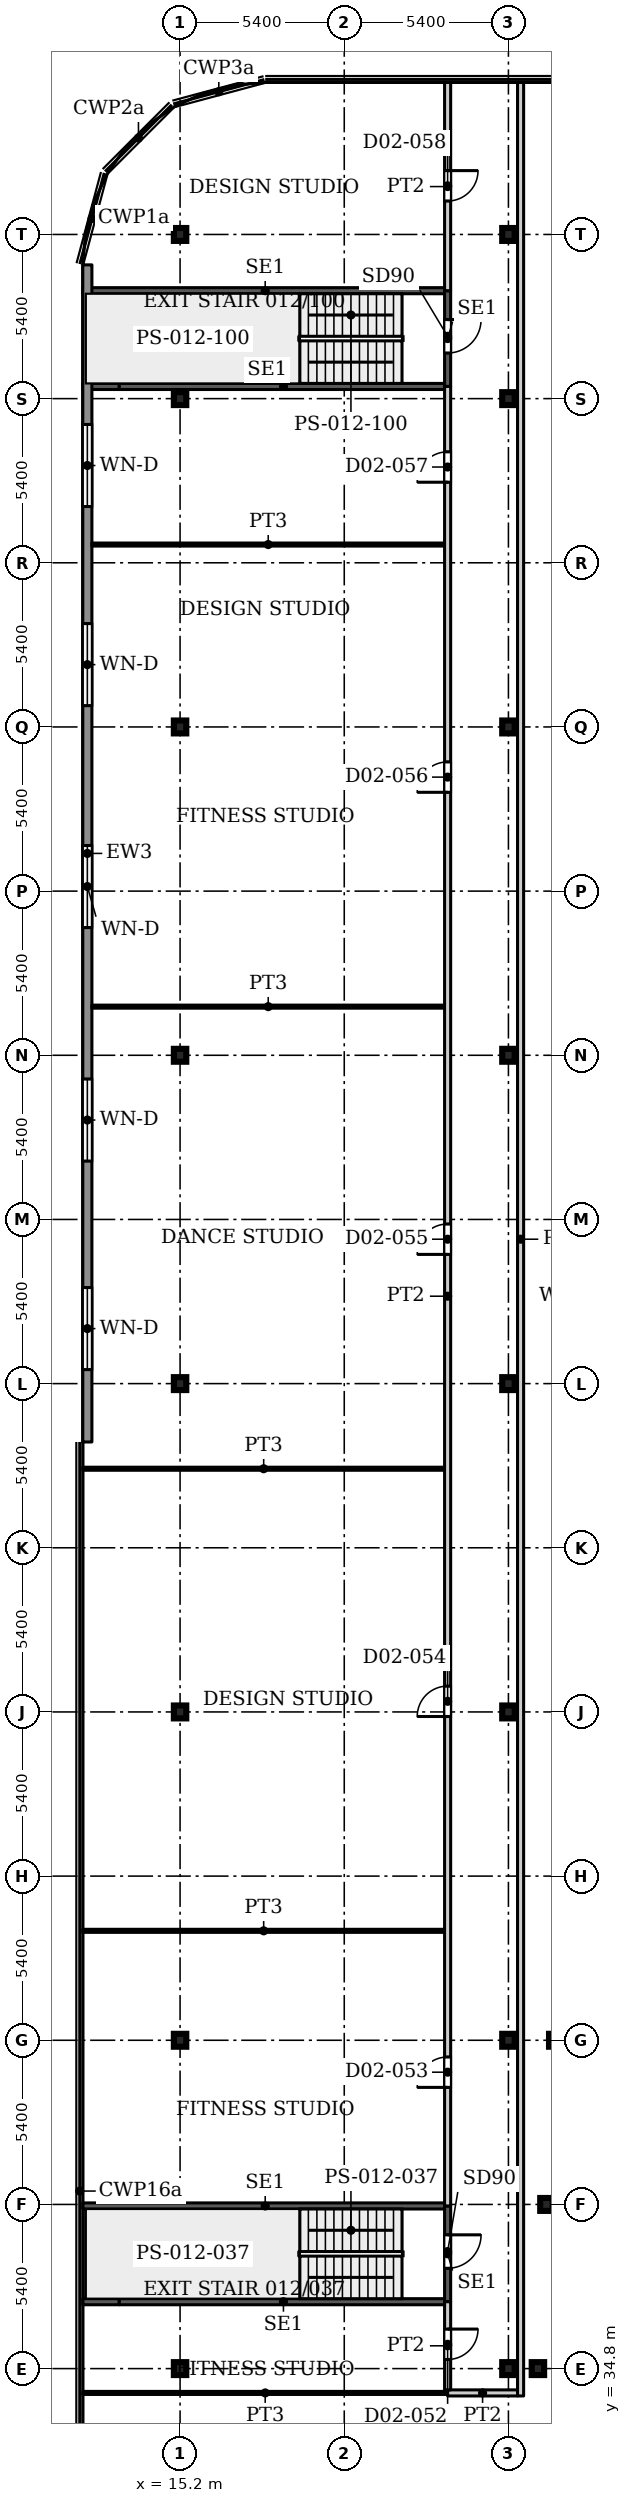
"""IFC4 building model, lengths in metres.
Left out: names, types, materials, properties, quantities, classifications, styles, units other than length and angle.
Written with IfcOpenShell. Run it as: python <this file> out.ifc"""

import sys

from ifc_helpers import new_model, si_unit, direction, frame, frame_2d, origin, origin_2d, place, context, subcontext, project, spatial, rectangle, i_section, extrude, source, transform, mapped, element, fill, save


model = new_model("IFC4")
c1 = context("Model", 3, precision=1e-05, world=origin(), true_north=direction((0.0, 1.0)))
c2 = subcontext(c1, "Body", "Model", "MODEL_VIEW")
j1 = project(units=[si_unit("LENGTHUNIT", "METRE"), si_unit("PLANEANGLEUNIT", "RADIAN")], contexts=[c1])
p1 = place(None, origin())
s1 = spatial("IfcSite", under=j1, at=p1, CompositionType="ELEMENT")
p2 = place(p1, origin())
s2 = spatial("IfcBuilding", under=s1, at=p2, CompositionType="ELEMENT")
p3 = place(p2, frame((0.0, 0.0, 12.5)))
s3 = spatial("IfcBuildingStorey", under=s2, at=p3, CompositionType="ELEMENT", Elevation=12.5)
for number, where, z_axis, x_axis in (
    (1, (15.2, 34.8, 0.0), (0.0, 0.0, 1.0), (1.0, 0.0, 0.0)),
    (2, (26.0, 34.8, 0.0), (0.0, 0.0, 1.0), (1.0, 0.0, 0.0)),
    (3, (15.2, 45.6, 0.0), (0.0, 0.0, 1.0), (1.0, 0.0, 0.0)),
    (4, (26.0, 45.6, 0.0), (0.0, 0.0, 1.0), (1.0, 0.0, 0.0)),
    (5, (15.2, 56.4, 0.0), (0.0, 0.0, 1.0), (1.0, 0.0, 0.0)),
    (6, (26.0, 56.4, 0.0), (0.0, 0.0, 1.0), (1.0, 0.0, 0.0)),
    (7, (15.2, 67.2, 0.0), (0.0, 0.0, 1.0), (1.0, 0.0, 0.0)),
    (8, (26.0, 67.2, 0.0), (0.0, 0.0, 1.0), (1.0, 0.0, 0.0)),
    (9, (15.2, 78.0, 0.0), (0.0, 0.0, 1.0), (1.0, 0.0, 0.0)),
    (10, (26.0, 78.0, 0.0), (0.0, 0.0, 1.0), (1.0, 0.0, 0.0)),
    (11, (15.2, 88.8, 0.0), (0.0, 0.0, 1.0), (1.0, 0.0, 0.0)),
    (12, (26.0, 88.8, 0.0), (0.0, 0.0, 1.0), (1.0, 0.0, 0.0)),
    (13, (15.2, 99.6, 0.0), (0.0, 0.0, 1.0), (1.0, 0.0, 0.0)),
    (14, (26.0, 99.6, 0.0), (0.0, 0.0, 1.0), (1.0, 0.0, 0.0)),
    (15, (15.2, 105.0, 0.0), (0.0, 0.0, 1.0), (1.0, 0.0, 0.0)),
    (16, (26.0, 105.0, 0.0), (0.0, 0.0, 1.0), (1.0, 0.0, 0.0)),
    (17, (26.97, 34.8, 0.0), (0.0, 0.0, 1.0), (1.0, 0.0, 0.0)),
    (18, (27.25, 40.2, 0.0), (0.0, 0.0, 1.0), (1.0, 0.0, 0.0)),
    (19, (27.54, 45.6, 0.0), (0.0, 0.0, 1.0), (1.0, 0.0, 0.0)),
):
    element("IfcColumn", number, at=place(p3, frame(where, z_axis=z_axis, x_axis=x_axis)), inside=s3, PredefinedType="COLUMN", context=c2, shape_type="SweptSolid", body=[
        extrude(i_section(OverallWidth=0.409, OverallDepth=0.425, WebThickness=0.033, FlangeThickness=0.052, FilletRadius=0.013, at=origin_2d()), origin(), (0.0, 0.0, 1.0), 4.5),
    ])
p4 = place(p3, frame((12.15, 65.28, 0.0), z_axis=(0.0, 0.0, 1.0), x_axis=(0.0, 1.0, 0.0)))
e20 = element("IfcWall", 20, at=p4, inside=s3, PredefinedType="SOLIDWALL", context=c2, shape_type="SweptSolid", body=[
    extrude(rectangle(XDim=38.72, YDim=0.3, at=frame_2d((19.36, 0.0))), origin(), (0.0, 0.0, 1.0), 4.25),
])
p5 = place(p4, frame((2.38, 0.0, 0.9)))
e21 = element("IfcOpeningElement", 21, at=p5, cuts=e20, PredefinedType="OPENING", context=c2, shape_type="SweptSolid", body=[
    extrude(rectangle(XDim=2.7, YDim=2.1, at=frame_2d((1.35, 1.05))), frame((0.0, 0.16, 0.0), z_axis=(0.0, -1.0, 0.0), x_axis=(1.0, 0.0, 0.0)), (0.0, 0.0, 1.0), 0.32),
])
p6 = place(p4, frame((9.24, 0.0, 0.9)))
e22 = element("IfcOpeningElement", 22, at=p6, cuts=e20, PredefinedType="OPENING", context=c2, shape_type="SweptSolid", body=[
    extrude(rectangle(XDim=2.7, YDim=2.1, at=frame_2d((1.35, 1.05))), frame((0.0, 0.16, 0.0), z_axis=(0.0, -1.0, 0.0), x_axis=(1.0, 0.0, 0.0)), (0.0, 0.0, 1.0), 0.32),
])
p7 = place(p4, frame((16.92, 0.0, 0.9)))
e23 = element("IfcOpeningElement", 23, at=p7, cuts=e20, PredefinedType="OPENING", context=c2, shape_type="SweptSolid", body=[
    extrude(rectangle(XDim=2.7, YDim=2.1, at=frame_2d((1.35, 1.05))), frame((0.0, 0.16, 0.0), z_axis=(0.0, -1.0, 0.0), x_axis=(1.0, 0.0, 0.0)), (0.0, 0.0, 1.0), 0.32),
])
p8 = place(p4, frame((24.22, 0.0, 0.9)))
e24 = element("IfcOpeningElement", 24, at=p8, cuts=e20, PredefinedType="OPENING", context=c2, shape_type="SweptSolid", body=[
    extrude(rectangle(XDim=2.7, YDim=2.1, at=frame_2d((1.35, 1.05))), frame((0.0, 0.16, 0.0), z_axis=(0.0, -1.0, 0.0), x_axis=(1.0, 0.0, 0.0)), (0.0, 0.0, 1.0), 0.32),
])
p9 = place(p4, frame((30.77, 0.0, 0.9)))
e25 = element("IfcOpeningElement", 25, at=p9, cuts=e20, PredefinedType="OPENING", context=c2, shape_type="SweptSolid", body=[
    extrude(rectangle(XDim=2.7, YDim=2.1, at=frame_2d((1.35, 1.05))), frame((0.0, 0.16, 0.0), z_axis=(0.0, -1.0, 0.0), x_axis=(1.0, 0.0, 0.0)), (0.0, 0.0, 1.0), 0.32),
])
p10 = place(p3, frame((12.0, 37.0, 0.0), z_axis=(0.0, 0.0, 1.0), x_axis=(1.0, 0.0, 0.0)))
e26 = element("IfcWall", 26, at=p10, inside=s3, PredefinedType="SHEAR", context=c2, shape_type="SweptSolid", body=[
    extrude(rectangle(XDim=1.2, YDim=0.2, at=frame_2d((0.6, 0.0))), origin(), (0.0, 0.0, 1.0), 4.5),
])
p11 = place(p3, frame((13.2, 37.0, 0.0), z_axis=(0.0, 0.0, 1.0), x_axis=(1.0, 0.0, 0.0)))
e27 = element("IfcWall", 27, at=p11, inside=s3, PredefinedType="SHEAR", context=c2, shape_type="SweptSolid", body=[
    extrude(rectangle(XDim=10.8, YDim=0.2, at=frame_2d((5.4, 0.0))), origin(), (0.0, 0.0, 1.0), 4.5),
])
p12 = place(p3, frame((12.0, 40.15, 0.0), z_axis=(0.0, 0.0, 1.0), x_axis=(1.0, 0.0, 0.0)))
e28 = element("IfcWall", 28, at=p12, inside=s3, PredefinedType="SHEAR", context=c2, shape_type="SweptSolid", body=[
    extrude(rectangle(XDim=12.0, YDim=0.2, at=frame_2d((6.0, 0.0))), origin(), (0.0, 0.0, 1.0), 4.5),
])
p13 = place(p3, frame((24.0, 37.0, 0.0), z_axis=(0.0, 0.0, 1.0), x_axis=(0.0, 1.0, 0.0)))
e29 = element("IfcWall", 29, at=p13, inside=s3, PredefinedType="SHEAR", context=c2, shape_type="SweptSolid", body=[
    extrude(rectangle(XDim=3.15, YDim=0.2, at=frame_2d((1.575, 0.0))), origin(), (0.0, 0.0, 1.0), 4.5),
])
p14 = place(p13, frame((1.1, 0.0, 0.0)))
e30 = element("IfcOpeningElement", 30, at=p14, cuts=e29, PredefinedType="OPENING", context=c2, shape_type="SweptSolid", body=[
    extrude(rectangle(XDim=1.1, YDim=2.2, at=frame_2d((0.55, 1.1))), frame((0.0, 0.11, 0.0), z_axis=(0.0, -1.0, 0.0), x_axis=(1.0, 0.0, 0.0)), (0.0, 0.0, 1.0), 0.22),
])
p15 = place(p3, frame((12.0, 100.0, 0.0), z_axis=(0.0, 0.0, 1.0), x_axis=(1.0, 0.0, 0.0)))
e31 = element("IfcWall", 31, at=p15, inside=s3, PredefinedType="SHEAR", context=c2, shape_type="SweptSolid", body=[
    extrude(rectangle(XDim=1.2, YDim=0.2, at=frame_2d((0.6, 0.0))), origin(), (0.0, 0.0, 1.0), 4.5),
])
p16 = place(p3, frame((13.2, 100.0, 0.0), z_axis=(0.0, 0.0, 1.0), x_axis=(1.0, 0.0, 0.0)))
e32 = element("IfcWall", 32, at=p16, inside=s3, PredefinedType="SHEAR", context=c2, shape_type="SweptSolid", body=[
    extrude(rectangle(XDim=10.8, YDim=0.2, at=frame_2d((5.4, 0.0))), origin(), (0.0, 0.0, 1.0), 4.5),
])
p17 = place(p3, frame((12.0, 103.15, 0.0), z_axis=(0.0, 0.0, 1.0), x_axis=(1.0, 0.0, 0.0)))
e33 = element("IfcWall", 33, at=p17, inside=s3, PredefinedType="SHEAR", context=c2, shape_type="SweptSolid", body=[
    extrude(rectangle(XDim=12.0, YDim=0.2, at=frame_2d((6.0, 0.0))), origin(), (0.0, 0.0, 1.0), 4.5),
])
p18 = place(p3, frame((24.0, 100.0, 0.0), z_axis=(0.0, 0.0, 1.0), x_axis=(0.0, 1.0, 0.0)))
e34 = element("IfcWall", 34, at=p18, inside=s3, PredefinedType="SHEAR", context=c2, shape_type="SweptSolid", body=[
    extrude(rectangle(XDim=3.15, YDim=0.2, at=frame_2d((1.575, 0.0))), origin(), (0.0, 0.0, 1.0), 4.5),
])
p19 = place(p18, frame((1.1, 0.0, 0.0)))
e35 = element("IfcOpeningElement", 35, at=p19, cuts=e34, PredefinedType="OPENING", context=c2, shape_type="SweptSolid", body=[
    extrude(rectangle(XDim=1.1, YDim=2.2, at=frame_2d((0.55, 1.1))), frame((0.0, 0.11, 0.0), z_axis=(0.0, -1.0, 0.0), x_axis=(1.0, 0.0, 0.0)), (0.0, 0.0, 1.0), 0.22),
])
p20 = place(p3, frame((12.0, 34.0, 0.0), z_axis=(0.0, 0.0, 1.0), x_axis=(1.0, 0.0, 0.0)))
e36 = element("IfcWall", 36, at=p20, inside=s3, PredefinedType="PARTITIONING", context=c2, shape_type="SweptSolid", body=[
    extrude(rectangle(XDim=12.0, YDim=0.1, at=frame_2d((6.0, 0.0))), origin(), (0.0, 0.0, 1.0), 4.18),
])
for number, where, z_axis, x_axis in (
    (37, (12.0, 49.2, 0.0), (0.0, 0.0, 1.0), (1.0, 0.0, 0.0)),
    (38, (12.0, 64.4, 0.0), (0.0, 0.0, 1.0), (1.0, 0.0, 0.0)),
):
    element("IfcWall", number, at=place(p3, frame(where, z_axis=z_axis, x_axis=x_axis)), inside=s3, PredefinedType="PARTITIONING", context=c2, shape_type="SweptSolid", body=[
        extrude(rectangle(XDim=11.9, YDim=0.1, at=frame_2d((5.95, 0.0))), origin(), (0.0, 0.0, 1.0), 4.18),
    ])
for number, where, z_axis, x_axis in (
    (39, (12.299, 79.6, 0.0), (0.0, 0.0, 1.0), (1.0, 0.0, 0.0)),
    (40, (12.299, 94.8, 0.0), (0.0, 0.0, 1.0), (1.0, 0.0, 0.0)),
):
    element("IfcWall", number, at=place(p3, frame(where, z_axis=z_axis, x_axis=x_axis)), inside=s3, PredefinedType="PARTITIONING", context=c2, shape_type="SweptSolid", body=[
        extrude(rectangle(XDim=11.601, YDim=0.1, at=frame_2d((5.8, 0.0))), origin(), (0.0, 0.0, 1.0), 4.18),
    ])
p21 = place(p3, frame((24.0, 34.0, 0.0), z_axis=(0.0, 0.0, 1.0), x_axis=(1.0, 0.0, 0.0)))
e41 = element("IfcWall", 41, at=p21, inside=s3, PredefinedType="PARTITIONING", context=c2, shape_type="SweptSolid", body=[
    extrude(rectangle(XDim=2.3, YDim=0.2, at=frame_2d((1.15, 0.0))), origin(), (0.0, 0.0, 1.0), 4.18),
])
p22 = place(p3, frame((24.0, 34.1, 0.0), z_axis=(0.0, 0.0, 1.0), x_axis=(0.0, 1.0, 0.0)))
e42 = element("IfcWall", 42, at=p22, inside=s3, PredefinedType="PARTITIONING", context=c2, shape_type="SweptSolid", body=[
    extrude(rectangle(XDim=2.9, YDim=0.2, at=frame_2d((1.45, 0.0))), origin(), (0.0, 0.0, 1.0), 4.18),
])
p23 = place(p22, frame((1.0, 0.0, 0.0)))
e43 = element("IfcOpeningElement", 43, at=p23, cuts=e42, PredefinedType="OPENING", context=c2, shape_type="SweptSolid", body=[
    extrude(rectangle(XDim=1.0, YDim=2.1, at=frame_2d((0.5, 1.05))), frame((0.0, 0.11, 0.0), z_axis=(0.0, -1.0, 0.0), x_axis=(1.0, 0.0, 0.0)), (0.0, 0.0, 1.0), 0.22),
])
p24 = place(p3, frame((24.0, 40.15, 0.0), z_axis=(0.0, 0.0, 1.0), x_axis=(0.0, 1.0, 0.0)))
e44 = element("IfcWall", 44, at=p24, inside=s3, PredefinedType="PARTITIONING", context=c2, shape_type="SweptSolid", body=[
    extrude(rectangle(XDim=59.85, YDim=0.2, at=frame_2d((29.925, 0.0))), origin(), (0.0, 0.0, 1.0), 4.18),
])
p25 = place(p24, frame((3.9, 0.0, 0.0)))
e45 = element("IfcOpeningElement", 45, at=p25, cuts=e44, PredefinedType="OPENING", context=c2, shape_type="SweptSolid", body=[
    extrude(rectangle(XDim=1.0, YDim=2.1, at=frame_2d((0.5, 1.05))), frame((0.0, 0.11, 0.0), z_axis=(0.0, -1.0, 0.0), x_axis=(1.0, 0.0, 0.0)), (0.0, 0.0, 1.0), 0.22),
])
p26 = place(p24, frame((16.1, 0.0, 0.0)))
e46 = element("IfcOpeningElement", 46, at=p26, cuts=e44, PredefinedType="OPENING", context=c2, shape_type="SweptSolid", body=[
    extrude(rectangle(XDim=1.0, YDim=2.1, at=frame_2d((0.5, 1.05))), frame((0.0, 0.11, 0.0), z_axis=(0.0, -1.0, 0.0), x_axis=(1.0, 0.0, 0.0)), (0.0, 0.0, 1.0), 0.22),
])
p27 = place(p24, frame((31.3, 0.0, 0.0)))
e47 = element("IfcOpeningElement", 47, at=p27, cuts=e44, PredefinedType="OPENING", context=c2, shape_type="SweptSolid", body=[
    extrude(rectangle(XDim=1.0, YDim=2.1, at=frame_2d((0.5, 1.05))), frame((0.0, 0.11, 0.0), z_axis=(0.0, -1.0, 0.0), x_axis=(1.0, 0.0, 0.0)), (0.0, 0.0, 1.0), 0.22),
])
p28 = place(p24, frame((46.5, 0.0, 0.0)))
e48 = element("IfcOpeningElement", 48, at=p28, cuts=e44, PredefinedType="OPENING", context=c2, shape_type="SweptSolid", body=[
    extrude(rectangle(XDim=1.0, YDim=2.1, at=frame_2d((0.5, 1.05))), frame((0.0, 0.11, 0.0), z_axis=(0.0, -1.0, 0.0), x_axis=(1.0, 0.0, 0.0)), (0.0, 0.0, 1.0), 0.22),
])
p29 = place(p24, frame((56.7, 0.0, 0.0)))
e49 = element("IfcOpeningElement", 49, at=p29, cuts=e44, PredefinedType="OPENING", context=c2, shape_type="SweptSolid", body=[
    extrude(rectangle(XDim=1.0, YDim=2.1, at=frame_2d((0.5, 1.05))), frame((0.0, 0.11, 0.0), z_axis=(0.0, -1.0, 0.0), x_axis=(1.0, 0.0, 0.0)), (0.0, 0.0, 1.0), 0.22),
])
p30 = place(p3, frame((24.0, 103.15, 0.0), z_axis=(0.0, 0.0, 1.0), x_axis=(0.0, 1.0, 0.0)))
e50 = element("IfcWall", 50, at=p30, inside=s3, PredefinedType="PARTITIONING", context=c2, shape_type="SweptSolid", body=[
    extrude(rectangle(XDim=6.85, YDim=0.2, at=frame_2d((3.425, 0.0))), origin(), (0.0, 0.0, 1.0), 4.18),
])
p31 = place(p30, frame((2.95, 0.0, 0.0)))
e51 = element("IfcOpeningElement", 51, at=p31, cuts=e50, PredefinedType="OPENING", context=c2, shape_type="SweptSolid", body=[
    extrude(rectangle(XDim=1.0, YDim=2.1, at=frame_2d((0.5, 1.05))), frame((0.0, 0.11, 0.0), z_axis=(0.0, -1.0, 0.0), x_axis=(1.0, 0.0, 0.0)), (0.0, 0.0, 1.0), 0.22),
])
p32 = place(p3, frame((26.4, 33.9, 0.0), z_axis=(0.0, 0.0, 1.0), x_axis=(0.0, 1.0, 0.0)))
e52 = element("IfcWall", 52, at=p32, inside=s3, PredefinedType="PARTITIONING", context=c2, shape_type="SweptSolid", body=[
    extrude(rectangle(XDim=76.1, YDim=0.2, at=frame_2d((38.05, 0.0))), origin(), (0.0, 0.0, 1.0), 4.18),
])
m1 = source(origin(), c2, "Body", "SweptSolid", [
    extrude(rectangle(XDim=2.7, YDim=2.1, at=frame_2d((1.35, 1.05))), frame((0.0, 0.03, 0.0), z_axis=(0.0, -1.0, 0.0), x_axis=(1.0, 0.0, 0.0)), (0.0, 0.0, 1.0), 0.06),
])
p33 = place(p5, origin())
e53 = element("IfcWindow", 53, at=p33, inside=s3, PartitioningType="SINGLE_PANEL", PredefinedType="WINDOW", context=c2, shape_type="MappedRepresentation", body=[
    mapped(m1, transform((0.0, 0.0, 0.0), x_axis=(1.0, 0.0, 0.0), y_axis=(0.0, 1.0, 0.0), z_axis=(0.0, 0.0, 1.0), scale=1.0)),
])
fill(e21, e53)
p34 = place(p6, origin())
e54 = element("IfcWindow", 54, at=p34, inside=s3, PartitioningType="SINGLE_PANEL", PredefinedType="WINDOW", context=c2, shape_type="MappedRepresentation", body=[
    mapped(m1, transform((0.0, 0.0, 0.0), x_axis=(1.0, 0.0, 0.0), y_axis=(0.0, 1.0, 0.0), z_axis=(0.0, 0.0, 1.0), scale=1.0)),
])
fill(e22, e54)
p35 = place(p7, origin())
e55 = element("IfcWindow", 55, at=p35, inside=s3, PartitioningType="SINGLE_PANEL", PredefinedType="WINDOW", context=c2, shape_type="MappedRepresentation", body=[
    mapped(m1, transform((0.0, 0.0, 0.0), x_axis=(1.0, 0.0, 0.0), y_axis=(0.0, 1.0, 0.0), z_axis=(0.0, 0.0, 1.0), scale=1.0)),
])
fill(e23, e55)
p36 = place(p8, origin())
e56 = element("IfcWindow", 56, at=p36, inside=s3, PartitioningType="SINGLE_PANEL", PredefinedType="WINDOW", context=c2, shape_type="MappedRepresentation", body=[
    mapped(m1, transform((0.0, 0.0, 0.0), x_axis=(1.0, 0.0, 0.0), y_axis=(0.0, 1.0, 0.0), z_axis=(0.0, 0.0, 1.0), scale=1.0)),
])
fill(e24, e56)
p37 = place(p9, origin())
e57 = element("IfcWindow", 57, at=p37, inside=s3, PartitioningType="SINGLE_PANEL", PredefinedType="WINDOW", context=c2, shape_type="MappedRepresentation", body=[
    mapped(m1, transform((0.0, 0.0, 0.0), x_axis=(1.0, 0.0, 0.0), y_axis=(0.0, 1.0, 0.0), z_axis=(0.0, 0.0, 1.0), scale=1.0)),
])
fill(e25, e57)
m2 = source(origin(), c2, "Body", "SweptSolid", [
    extrude(rectangle(XDim=1.1, YDim=2.2, at=frame_2d((0.55, 1.1))), frame((0.0, 0.025, 0.0), z_axis=(0.0, -1.0, 0.0), x_axis=(1.0, 0.0, 0.0)), (0.0, 0.0, 1.0), 0.05),
])
p38 = place(p14, origin())
e58 = element("IfcDoor", 58, at=p38, inside=s3, OperationType="SINGLE_SWING_RIGHT", PredefinedType="DOOR", context=c2, shape_type="MappedRepresentation", body=[
    mapped(m2, transform((0.0, 0.0, 0.0), x_axis=(1.0, 0.0, 0.0), y_axis=(0.0, 1.0, 0.0), z_axis=(0.0, 0.0, 1.0), scale=1.0)),
])
fill(e30, e58)
p39 = place(p19, origin())
e59 = element("IfcDoor", 59, at=p39, inside=s3, OperationType="SINGLE_SWING_RIGHT", PredefinedType="DOOR", context=c2, shape_type="MappedRepresentation", body=[
    mapped(m2, transform((0.0, 0.0, 0.0), x_axis=(1.0, 0.0, 0.0), y_axis=(0.0, 1.0, 0.0), z_axis=(0.0, 0.0, 1.0), scale=1.0)),
])
fill(e35, e59)
m3 = source(origin(), c2, "Body", "SweptSolid", [
    extrude(rectangle(XDim=1.0, YDim=2.1, at=frame_2d((0.5, 1.05))), frame((0.0, 0.025, 0.0), z_axis=(0.0, -1.0, 0.0), x_axis=(1.0, 0.0, 0.0)), (0.0, 0.0, 1.0), 0.05),
])
p40 = place(p23, origin())
e60 = element("IfcDoor", 60, at=p40, inside=s3, OperationType="SINGLE_SWING_RIGHT", PredefinedType="DOOR", context=c2, shape_type="MappedRepresentation", body=[
    mapped(m3, transform((0.0, 0.0, 0.0), x_axis=(1.0, 0.0, 0.0), y_axis=(0.0, 1.0, 0.0), z_axis=(0.0, 0.0, 1.0), scale=1.0)),
])
fill(e43, e60)
p41 = place(p25, origin())
e61 = element("IfcDoor", 61, at=p41, inside=s3, OperationType="SINGLE_SWING_LEFT", PredefinedType="DOOR", context=c2, shape_type="MappedRepresentation", body=[
    mapped(m3, transform((0.0, 0.0, 0.0), x_axis=(1.0, 0.0, 0.0), y_axis=(0.0, 1.0, 0.0), z_axis=(0.0, 0.0, 1.0), scale=1.0)),
])
fill(e45, e61)
p42 = place(p26, origin())
e62 = element("IfcDoor", 62, at=p42, inside=s3, OperationType="SINGLE_SWING_LEFT", PredefinedType="DOOR", context=c2, shape_type="MappedRepresentation", body=[
    mapped(m3, transform((0.0, 0.0, 0.0), x_axis=(1.0, 0.0, 0.0), y_axis=(0.0, 1.0, 0.0), z_axis=(0.0, 0.0, 1.0), scale=1.0)),
])
fill(e46, e62)
p43 = place(p27, origin())
e63 = element("IfcDoor", 63, at=p43, inside=s3, OperationType="SINGLE_SWING_LEFT", PredefinedType="DOOR", context=c2, shape_type="MappedRepresentation", body=[
    mapped(m3, transform((0.0, 0.0, 0.0), x_axis=(1.0, 0.0, 0.0), y_axis=(0.0, 1.0, 0.0), z_axis=(0.0, 0.0, 1.0), scale=1.0)),
])
fill(e47, e63)
p44 = place(p28, origin())
e64 = element("IfcDoor", 64, at=p44, inside=s3, OperationType="SINGLE_SWING_LEFT", PredefinedType="DOOR", context=c2, shape_type="MappedRepresentation", body=[
    mapped(m3, transform((0.0, 0.0, 0.0), x_axis=(1.0, 0.0, 0.0), y_axis=(0.0, 1.0, 0.0), z_axis=(0.0, 0.0, 1.0), scale=1.0)),
])
fill(e48, e64)
p45 = place(p29, origin())
e65 = element("IfcDoor", 65, at=p45, inside=s3, OperationType="SINGLE_SWING_LEFT", PredefinedType="DOOR", context=c2, shape_type="MappedRepresentation", body=[
    mapped(m3, transform((0.0, 0.0, 0.0), x_axis=(1.0, 0.0, 0.0), y_axis=(0.0, 1.0, 0.0), z_axis=(0.0, 0.0, 1.0), scale=1.0)),
])
fill(e49, e65)
p46 = place(p31, origin())
e66 = element("IfcDoor", 66, at=p46, inside=s3, OperationType="SINGLE_SWING_RIGHT", PredefinedType="DOOR", context=c2, shape_type="MappedRepresentation", body=[
    mapped(m3, transform((0.0, 0.0, 0.0), x_axis=(1.0, 0.0, 0.0), y_axis=(0.0, 1.0, 0.0), z_axis=(0.0, 0.0, 1.0), scale=1.0)),
])
fill(e51, e66)
save(model, sys.argv[1])
